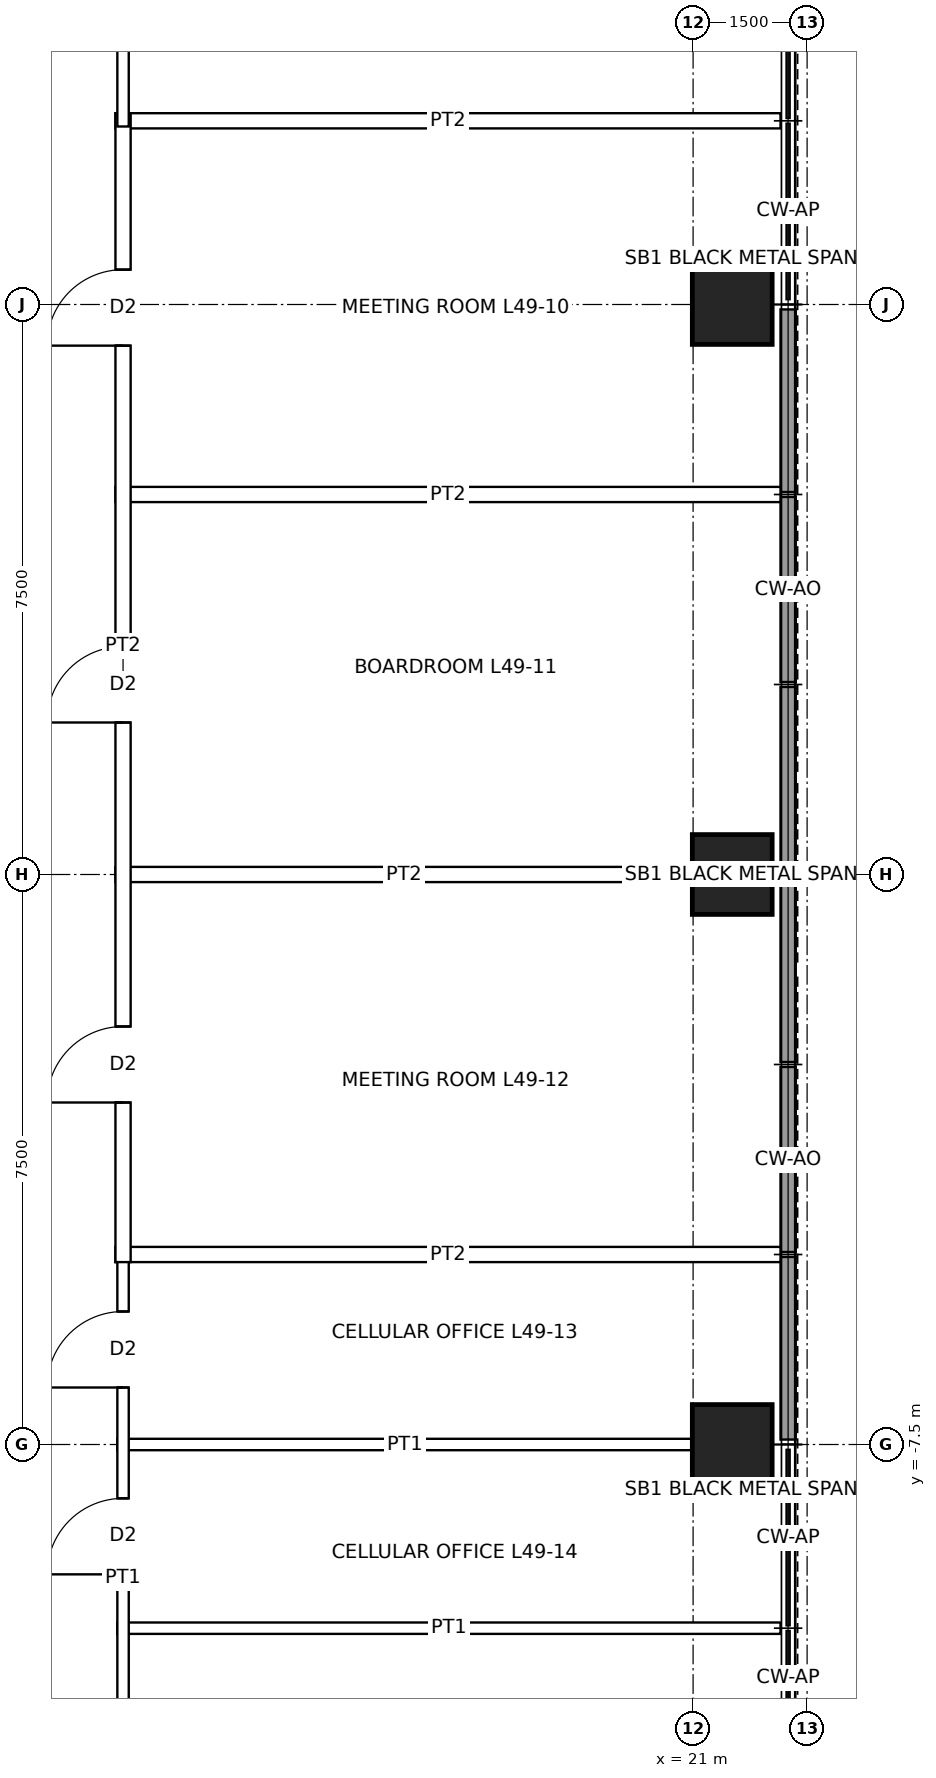
"""IFC4 building model, lengths in metres.
Left out: names, types, materials, properties, quantities, classifications, styles, units other than length and angle.
Written with IfcOpenShell. Run it as: python <this file> out.ifc"""

import sys

from ifc_helpers import new_model, si_unit, direction, frame, frame_2d, origin, origin_2d, place, context, subcontext, project, spatial, rectangle, hollow_rectangle, extrude, element, fill, save


model = new_model("IFC4")
c1 = context("Model", 3, precision=1e-05, world=origin(), true_north=direction((0.0, 1.0)))
c2 = subcontext(c1, "Body", "Model", "MODEL_VIEW")
j1 = project(units=[si_unit("LENGTHUNIT", "METRE"), si_unit("PLANEANGLEUNIT", "RADIAN")], contexts=[c1])
p1 = place(None, origin())
s1 = spatial("IfcSite", under=j1, at=p1, CompositionType="ELEMENT")
p2 = place(p1, origin())
s2 = spatial("IfcBuilding", under=s1, at=p2, CompositionType="ELEMENT")
p3 = place(p2, frame((0.0, 0.0, 229.9)))
s3 = spatial("IfcBuildingStorey", under=s2, at=p3, CompositionType="ELEMENT", Elevation=229.9)
for number, where, z_axis, x_axis in (
    (1, (21.515, 7.5, 0.0), (0.0, 0.0, 1.0), (1.0, 0.0, 0.0)),
    (2, (21.515, 0.0, 0.0), (0.0, 0.0, 1.0), (1.0, 0.0, 0.0)),
    (3, (21.515, -7.5, 0.0), (0.0, 0.0, 1.0), (1.0, 0.0, 0.0)),
):
    element("IfcColumn", number, at=place(p3, frame(where, z_axis=z_axis, x_axis=x_axis)), inside=s3, PredefinedType="COLUMN", context=c2, shape_type="SweptSolid", body=[
        extrude(hollow_rectangle(XDim=1.05, YDim=1.05, WallThickness=0.07, at=origin_2d()), origin(), (0.0, 0.0, 1.0), 4.0),
    ])
p4 = place(p3, frame((22.25, 7.435, 0.0), z_axis=(0.0, 0.0, 1.0), x_axis=(0.0, -1.0, 0.0)))
e4 = element("IfcWall", 4, at=p4, inside=s3, PredefinedType="SOLIDWALL", context=c2, shape_type="SweptSolid", body=[
    extrude(rectangle(XDim=2.403, YDim=0.2, at=frame_2d((1.201, 0.0))), origin(), (0.0, 0.0, 1.0), 3.85),
])
p5 = place(p3, frame((22.25, 4.968, 0.0), z_axis=(0.0, 0.0, 1.0), x_axis=(0.0, -1.0, 0.0)))
e5 = element("IfcWall", 5, at=p5, inside=s3, PredefinedType="SOLIDWALL", context=c2, shape_type="SweptSolid", body=[
    extrude(rectangle(XDim=2.435, YDim=0.2, at=frame_2d((1.218, 0.0))), origin(), (0.0, 0.0, 1.0), 3.85),
])
for number, where, z_axis, x_axis in (
    (6, (22.25, 2.468, 0.0), (0.0, 0.0, 1.0), (0.0, -1.0, 0.0)),
    (7, (22.25, -0.065, 0.0), (0.0, 0.0, 1.0), (0.0, -1.0, 0.0)),
):
    element("IfcWall", number, at=place(p3, frame(where, z_axis=z_axis, x_axis=x_axis)), inside=s3, PredefinedType="SOLIDWALL", context=c2, shape_type="SweptSolid", body=[
        extrude(rectangle(XDim=2.403, YDim=0.2, at=frame_2d((1.201, 0.0))), origin(), (0.0, 0.0, 1.0), 3.85),
    ])
p6 = place(p3, frame((22.25, -2.532, 0.0), z_axis=(0.0, 0.0, 1.0), x_axis=(0.0, -1.0, 0.0)))
e8 = element("IfcWall", 8, at=p6, inside=s3, PredefinedType="SOLIDWALL", context=c2, shape_type="SweptSolid", body=[
    extrude(rectangle(XDim=2.435, YDim=0.2, at=frame_2d((1.218, 0.0))), origin(), (0.0, 0.0, 1.0), 3.85),
])
p7 = place(p3, frame((22.25, -5.032, 0.0), z_axis=(0.0, 0.0, 1.0), x_axis=(0.0, -1.0, 0.0)))
e9 = element("IfcWall", 9, at=p7, inside=s3, PredefinedType="SOLIDWALL", context=c2, shape_type="SweptSolid", body=[
    extrude(rectangle(XDim=2.403, YDim=0.2, at=frame_2d((1.201, 0.0))), origin(), (0.0, 0.0, 1.0), 3.85),
])
p8 = place(p3, frame((13.425, -9.917, 0.0), z_axis=(0.0, 0.0, 1.0), x_axis=(1.0, 0.0, 0.0)))
e10 = element("IfcWall", 10, at=p8, inside=s3, PredefinedType="PARTITIONING", context=c2, shape_type="SweptSolid", body=[
    extrude(rectangle(XDim=8.725, YDim=0.15, at=frame_2d((4.362, 0.0))), origin(), (0.0, 0.0, 1.0), 3.85),
])
p9 = place(p3, frame((13.425, -7.5, 0.0), z_axis=(0.0, 0.0, 1.0), x_axis=(1.0, 0.0, 0.0)))
e11 = element("IfcWall", 11, at=p9, inside=s3, PredefinedType="PARTITIONING", context=c2, shape_type="SweptSolid", body=[
    extrude(rectangle(XDim=7.565, YDim=0.15, at=frame_2d((3.782, 0.0))), origin(), (0.0, 0.0, 1.0), 3.238),
])
p10 = place(p3, frame((13.4, -5.0, 0.0), z_axis=(0.0, 0.0, 1.0), x_axis=(1.0, 0.0, 0.0)))
e12 = element("IfcWall", 12, at=p10, inside=s3, PredefinedType="PARTITIONING", context=c2, shape_type="SweptSolid", body=[
    extrude(rectangle(XDim=8.75, YDim=0.2, at=frame_2d((4.375, 0.0))), origin(), (0.0, 0.0, 1.0), 3.85),
])
p11 = place(p3, frame((13.4, 0.0, 0.0), z_axis=(0.0, 0.0, 1.0), x_axis=(1.0, 0.0, 0.0)))
e13 = element("IfcWall", 13, at=p11, inside=s3, PredefinedType="PARTITIONING", context=c2, shape_type="SweptSolid", body=[
    extrude(rectangle(XDim=7.59, YDim=0.2, at=frame_2d((3.795, 0.0))), origin(), (0.0, 0.0, 1.0), 3.238),
])
for number, where, z_axis, x_axis in (
    (14, (13.4, 5.0, 0.0), (0.0, 0.0, 1.0), (1.0, 0.0, 0.0)),
    (15, (13.4, 9.917, 0.0), (0.0, 0.0, 1.0), (1.0, 0.0, 0.0)),
):
    element("IfcWall", number, at=place(p3, frame(where, z_axis=z_axis, x_axis=x_axis)), inside=s3, PredefinedType="PARTITIONING", context=c2, shape_type="SweptSolid", body=[
        extrude(rectangle(XDim=8.75, YDim=0.2, at=frame_2d((4.375, 0.0))), origin(), (0.0, 0.0, 1.0), 3.85),
    ])
p12 = place(p3, frame((13.5, -13.575, 0.0), z_axis=(0.0, 0.0, 1.0), x_axis=(0.0, 1.0, 0.0)))
e16 = element("IfcWall", 16, at=p12, inside=s3, PredefinedType="PARTITIONING", context=c2, shape_type="SweptSolid", body=[
    extrude(rectangle(XDim=8.65, YDim=0.15, at=frame_2d((4.325, 0.0))), origin(), (0.0, 0.0, 1.0), 3.85),
])
p13 = place(p12, frame((6.825, 0.0, 0.0)))
e17 = element("IfcOpeningElement", 17, at=p13, cuts=e16, PredefinedType="OPENING", context=c2, shape_type="SweptSolid", body=[
    extrude(rectangle(XDim=1.0, YDim=2.1, at=frame_2d((0.5, 1.05))), frame((0.0, 0.085, 0.0), z_axis=(0.0, -1.0, 0.0), x_axis=(1.0, 0.0, 0.0)), (0.0, 0.0, 1.0), 0.17),
])
p14 = place(p12, frame((4.366, 0.0, 0.0)))
e18 = element("IfcOpeningElement", 18, at=p14, cuts=e16, PredefinedType="OPENING", context=c2, shape_type="SweptSolid", body=[
    extrude(rectangle(XDim=1.0, YDim=2.1, at=frame_2d((0.5, 1.05))), frame((0.0, 0.085, 0.0), z_axis=(0.0, -1.0, 0.0), x_axis=(1.0, 0.0, 0.0)), (0.0, 0.0, 1.0), 0.17),
])
p15 = place(p3, frame((13.5, -5.1, 0.0), z_axis=(0.0, 0.0, 1.0), x_axis=(0.0, 1.0, 0.0)))
e19 = element("IfcWall", 19, at=p15, inside=s3, PredefinedType="PARTITIONING", context=c2, shape_type="SweptSolid", body=[
    extrude(rectangle(XDim=15.117, YDim=0.2, at=frame_2d((7.559, 0.0))), origin(), (0.0, 0.0, 1.0), 3.85),
])
p16 = place(p15, frame((12.059, 0.0, 0.0)))
e20 = element("IfcOpeningElement", 20, at=p16, cuts=e19, PredefinedType="OPENING", context=c2, shape_type="SweptSolid", body=[
    extrude(rectangle(XDim=1.0, YDim=2.1, at=frame_2d((0.5, 1.05))), frame((0.0, 0.11, 0.0), z_axis=(0.0, -1.0, 0.0), x_axis=(1.0, 0.0, 0.0)), (0.0, 0.0, 1.0), 0.22),
])
p17 = place(p15, frame((7.1, 0.0, 0.0)))
e21 = element("IfcOpeningElement", 21, at=p17, cuts=e19, PredefinedType="OPENING", context=c2, shape_type="SweptSolid", body=[
    extrude(rectangle(XDim=1.0, YDim=2.1, at=frame_2d((0.5, 1.05))), frame((0.0, 0.11, 0.0), z_axis=(0.0, -1.0, 0.0), x_axis=(1.0, 0.0, 0.0)), (0.0, 0.0, 1.0), 0.22),
])
p18 = place(p15, frame((2.1, 0.0, 0.0)))
e22 = element("IfcOpeningElement", 22, at=p18, cuts=e19, PredefinedType="OPENING", context=c2, shape_type="SweptSolid", body=[
    extrude(rectangle(XDim=1.0, YDim=2.1, at=frame_2d((0.5, 1.05))), frame((0.0, 0.11, 0.0), z_axis=(0.0, -1.0, 0.0), x_axis=(1.0, 0.0, 0.0)), (0.0, 0.0, 1.0), 0.22),
])
p19 = place(p3, frame((13.5, 9.842, 0.0), z_axis=(0.0, 0.0, 1.0), x_axis=(0.0, 1.0, 0.0)))
e23 = element("IfcWall", 23, at=p19, inside=s3, PredefinedType="PARTITIONING", context=c2, shape_type="SweptSolid", body=[
    extrude(rectangle(XDim=3.733, YDim=0.15, at=frame_2d((1.866, 0.0))), origin(), (0.0, 0.0, 1.0), 3.85),
])
p20 = place(p16, origin())
e24 = element("IfcDoor", 24, at=p20, inside=s3, OperationType="SINGLE_SWING_LEFT", PredefinedType="DOOR", context=c2, shape_type="SweptSolid", body=[
    extrude(rectangle(XDim=1.0, YDim=2.1, at=frame_2d((0.5, 1.05))), frame((0.0, 0.025, 0.0), z_axis=(0.0, -1.0, 0.0), x_axis=(1.0, 0.0, 0.0)), (0.0, 0.0, 1.0), 0.05),
])
fill(e20, e24)
p21 = place(p17, origin())
e25 = element("IfcDoor", 25, at=p21, inside=s3, OperationType="SINGLE_SWING_LEFT", PredefinedType="DOOR", context=c2, shape_type="SweptSolid", body=[
    extrude(rectangle(XDim=1.0, YDim=2.1, at=frame_2d((0.5, 1.05))), frame((0.0, 0.025, 0.0), z_axis=(0.0, -1.0, 0.0), x_axis=(1.0, 0.0, 0.0)), (0.0, 0.0, 1.0), 0.05),
])
fill(e21, e25)
p22 = place(p18, origin())
e26 = element("IfcDoor", 26, at=p22, inside=s3, OperationType="SINGLE_SWING_LEFT", PredefinedType="DOOR", context=c2, shape_type="SweptSolid", body=[
    extrude(rectangle(XDim=1.0, YDim=2.1, at=frame_2d((0.5, 1.05))), frame((0.0, 0.025, 0.0), z_axis=(0.0, -1.0, 0.0), x_axis=(1.0, 0.0, 0.0)), (0.0, 0.0, 1.0), 0.05),
])
fill(e22, e26)
p23 = place(p13, origin())
e27 = element("IfcDoor", 27, at=p23, inside=s3, OperationType="SINGLE_SWING_LEFT", PredefinedType="DOOR", context=c2, shape_type="SweptSolid", body=[
    extrude(rectangle(XDim=1.0, YDim=2.1, at=frame_2d((0.5, 1.05))), frame((0.0, 0.025, 0.0), z_axis=(0.0, -1.0, 0.0), x_axis=(1.0, 0.0, 0.0)), (0.0, 0.0, 1.0), 0.05),
])
fill(e17, e27)
p24 = place(p14, origin())
e28 = element("IfcDoor", 28, at=p24, inside=s3, OperationType="SINGLE_SWING_LEFT", PredefinedType="DOOR", context=c2, shape_type="SweptSolid", body=[
    extrude(rectangle(XDim=1.0, YDim=2.1, at=frame_2d((0.5, 1.05))), frame((0.0, 0.025, 0.0), z_axis=(0.0, -1.0, 0.0), x_axis=(1.0, 0.0, 0.0)), (0.0, 0.0, 1.0), 0.05),
])
fill(e18, e28)
save(model, sys.argv[1])
